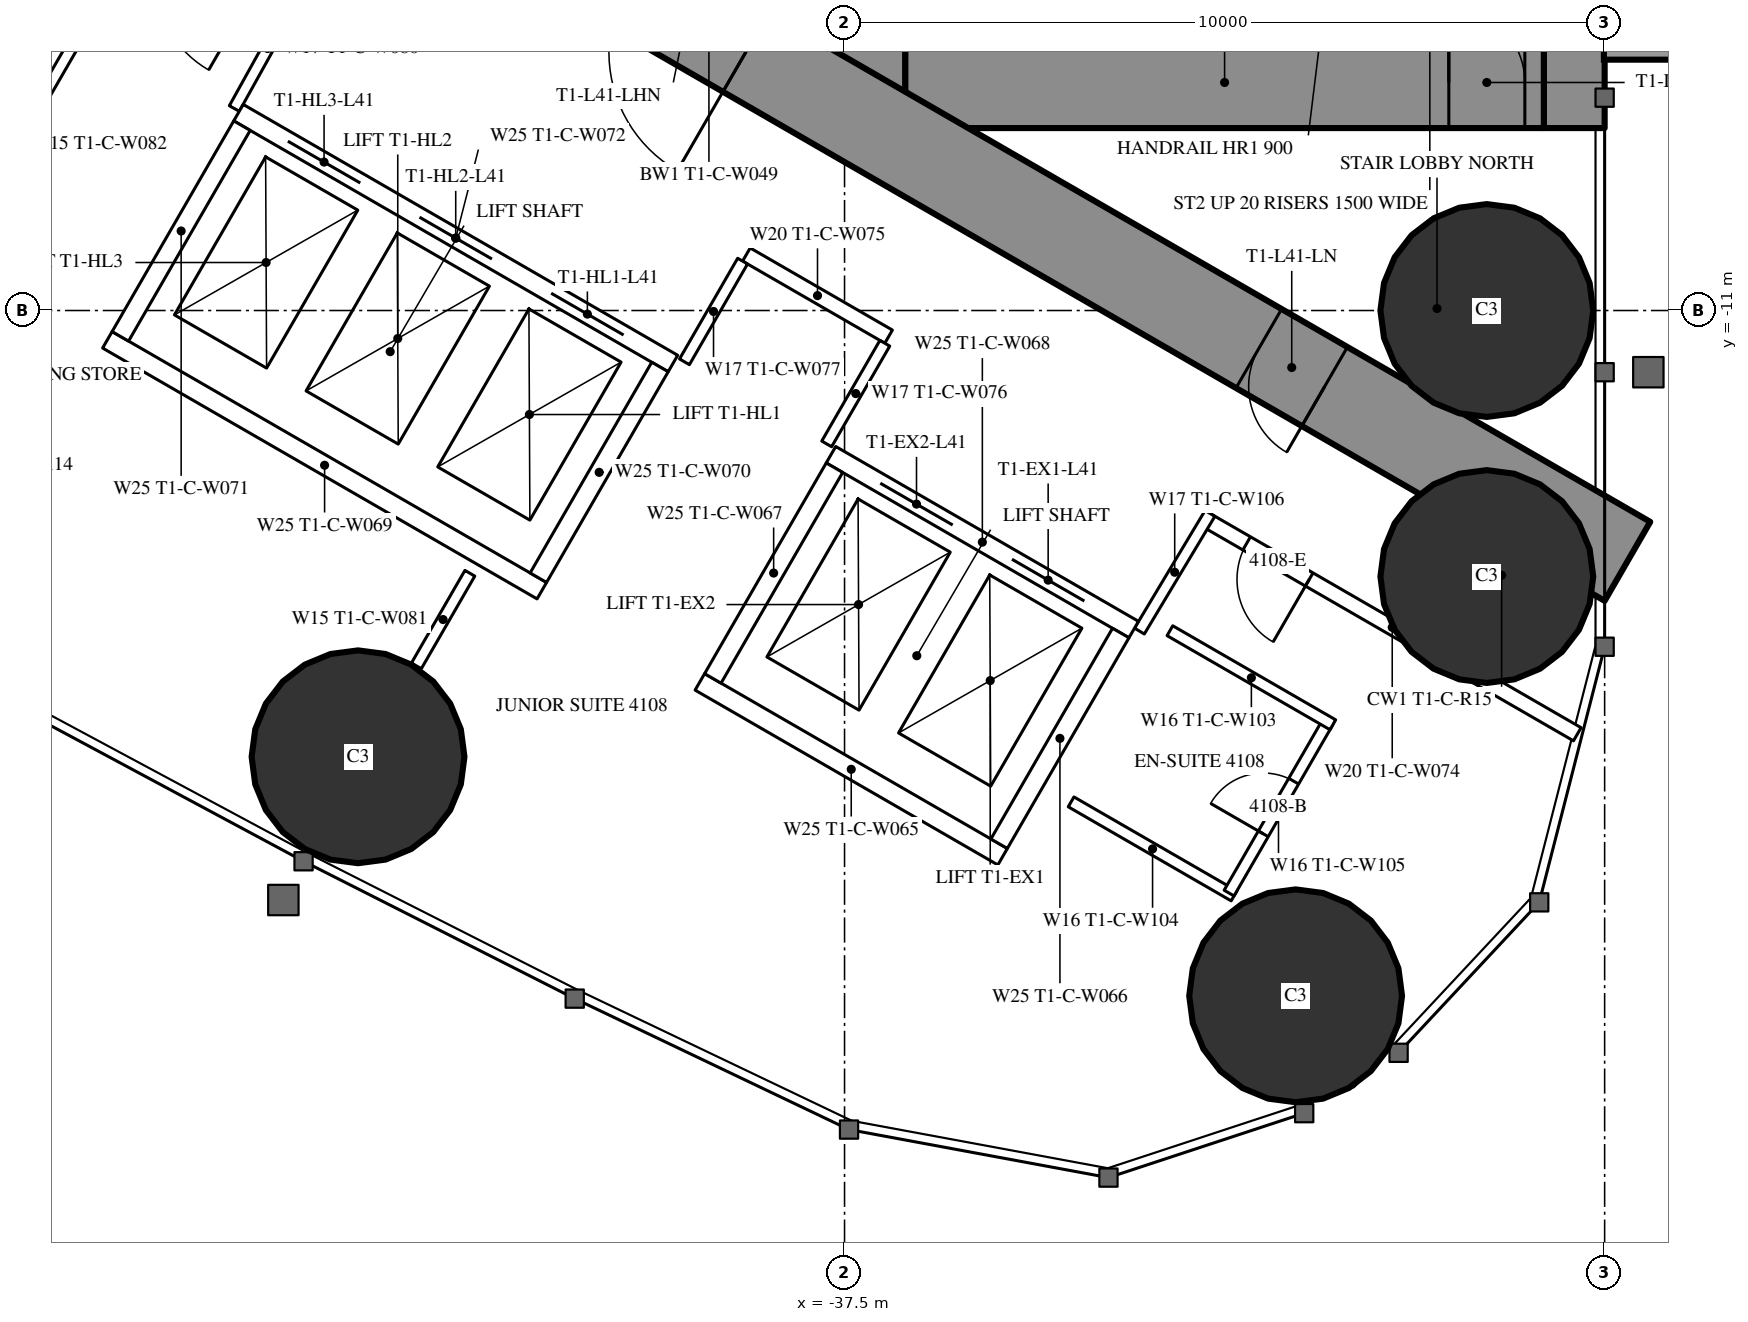
"""IFC4 building model, lengths in metres.
Left out: names, types, materials, properties, quantities, classifications, styles, units other than length and angle.
Written with IfcOpenShell. Run it as: python <this file> out.ifc"""

import sys

from ifc_helpers import new_model, si_unit, direction, frame, frame_2d, origin, origin_2d, place, context, subcontext, project, spatial, rectangle, circle, extrude, element, fill, save


model = new_model("IFC4")
c1 = context("Model", 3, precision=1e-05, world=origin(), true_north=direction((0.0, 1.0)))
c2 = subcontext(c1, "Body", "Model", "MODEL_VIEW")
j1 = project(units=[si_unit("LENGTHUNIT", "METRE"), si_unit("PLANEANGLEUNIT", "RADIAN")], contexts=[c1])
p1 = place(None, origin())
s1 = spatial("IfcSite", under=j1, at=p1, CompositionType="ELEMENT")
p2 = place(p1, origin())
s2 = spatial("IfcBuilding", under=s1, at=p2, CompositionType="ELEMENT")
p3 = place(p2, frame((0.0, 0.0, 156.3)))
s3 = spatial("IfcBuildingStorey", under=s2, at=p3, CompositionType="ELEMENT", Elevation=156.3)
for number, where, z_axis, x_axis in (
    (1, (-31.565, -20.016, 0.0), (0.0, 0.0, 1.0), (1.0, 0.0, 0.0)),
    (2, (-29.05, -11.0, 0.0), (0.0, 0.0, 1.0), (1.0, 0.0, 0.0)),
    (3, (-29.05, -14.5, 0.0), (0.0, 0.0, 1.0), (1.0, 0.0, 0.0)),
    (4, (-43.9, -16.871, 0.0), (0.0, 0.0, 1.0), (1.0, 0.0, 0.0)),
):
    element("IfcColumn", number, at=place(p3, frame(where, z_axis=z_axis, x_axis=x_axis)), inside=s3, PredefinedType="COLUMN", context=c2, shape_type="SweptSolid", body=[
        extrude(circle(Radius=1.4, at=origin_2d()), origin(), (0.0, 0.0, 1.0), 3.5),
    ])
p4 = place(p3, frame((-27.9, 8.6, 0.0), z_axis=(0.0, 0.0, 1.0), x_axis=(0.0, -1.0, 0.0)))
e5 = element("IfcWall", 5, at=p4, inside=s3, PredefinedType="SHEAR", context=c2, shape_type="SweptSolid", body=[
    extrude(rectangle(XDim=17.2, YDim=0.8, at=frame_2d((8.6, 0.0))), origin(), (0.0, 0.0, 1.0), 3.5),
])
p5 = place(p4, frame((2.45, 0.0, 0.6)))
e6 = element("IfcOpeningElement", 6, at=p5, cuts=e5, PredefinedType="OPENING", context=c2, shape_type="SweptSolid", body=[
    extrude(rectangle(XDim=0.6, YDim=2.1, at=frame_2d((0.3, 1.05))), frame((0.0, 0.41, 0.0), z_axis=(0.0, -1.0, 0.0), x_axis=(1.0, 0.0, 0.0)), (0.0, 0.0, 1.0), 0.82),
])
p6 = place(p4, frame((14.15, 0.0, 0.6)))
e7 = element("IfcOpeningElement", 7, at=p6, cuts=e5, PredefinedType="OPENING", context=c2, shape_type="SweptSolid", body=[
    extrude(rectangle(XDim=0.6, YDim=2.1, at=frame_2d((0.3, 1.05))), frame((0.0, 0.41, 0.0), z_axis=(0.0, -1.0, 0.0), x_axis=(1.0, 0.0, 0.0)), (0.0, 0.0, 1.0), 0.82),
])
p7 = place(p3, frame((-37.3, 8.6, 0.0), z_axis=(0.0, 0.0, 1.0), x_axis=(0.0, -1.0, 0.0)))
e8 = element("IfcWall", 8, at=p7, inside=s3, PredefinedType="SHEAR", context=c2, shape_type="SweptSolid", body=[
    extrude(rectangle(XDim=17.2, YDim=1.2, at=frame_2d((8.6, 0.0))), origin(), (0.0, 0.0, 1.0), 3.5),
])
p8 = place(p7, frame((7.7, 0.0, 0.0)))
e9 = element("IfcOpeningElement", 9, at=p8, cuts=e8, PredefinedType="OPENING", context=c2, shape_type="SweptSolid", body=[
    extrude(rectangle(XDim=1.8, YDim=2.2, at=frame_2d((0.9, 1.1))), frame((0.0, 0.61, 0.0), z_axis=(0.0, -1.0, 0.0), x_axis=(1.0, 0.0, 0.0)), (0.0, 0.0, 1.0), 1.22),
])
p9 = place(p3, frame((-28.3, -8.0, 0.0), z_axis=(0.0, 0.0, 1.0), x_axis=(-1.0, 0.0, 0.0)))
e10 = element("IfcWall", 10, at=p9, inside=s3, PredefinedType="SHEAR", context=c2, shape_type="SweptSolid", body=[
    extrude(rectangle(XDim=8.4, YDim=1.2, at=frame_2d((4.2, 0.0))), origin(), (0.0, 0.0, 1.0), 3.5),
])
p10 = place(p9, frame((0.25, 0.0, 0.0)))
e11 = element("IfcOpeningElement", 11, at=p10, cuts=e10, PredefinedType="OPENING", context=c2, shape_type="SweptSolid", body=[
    extrude(rectangle(XDim=1.0, YDim=2.2, at=frame_2d((0.5, 1.1))), frame((0.0, 0.61, 0.0), z_axis=(0.0, -1.0, 0.0), x_axis=(1.0, 0.0, 0.0)), (0.0, 0.0, 1.0), 1.22),
])
p11 = place(p3, frame((-27.2, -14.3, 0.0), z_axis=(0.0, 0.0, 1.0), x_axis=(-0.866024021859, 0.500002393557, 0.0)))
e12 = element("IfcWall", 12, at=p11, inside=s3, PredefinedType="SHEAR", context=c2, shape_type="SweptSolid", body=[
    extrude(rectangle(XDim=27.907, YDim=1.2, at=frame_2d((13.954, 0.0))), origin(), (0.0, 0.0, 1.0), 3.5),
])
p12 = place(p11, frame((4.6, 0.0, 0.0)))
e13 = element("IfcOpeningElement", 13, at=p12, cuts=e12, PredefinedType="OPENING", context=c2, shape_type="SweptSolid", body=[
    extrude(rectangle(XDim=1.0, YDim=2.2, at=frame_2d((0.5, 1.1))), frame((0.0, 0.61, 0.0), z_axis=(0.0, -1.0, 0.0), x_axis=(1.0, 0.0, 0.0)), (0.0, 0.0, 1.0), 1.22),
])
p13 = place(p11, frame((13.395, 0.0, 0.0)))
e14 = element("IfcOpeningElement", 14, at=p13, cuts=e12, PredefinedType="OPENING", context=c2, shape_type="SweptSolid", body=[
    extrude(rectangle(XDim=1.8, YDim=2.2, at=frame_2d((0.9, 1.1))), frame((0.0, 0.61, 0.0), z_axis=(0.0, -1.0, 0.0), x_axis=(1.0, 0.0, 0.0)), (0.0, 0.0, 1.0), 1.22),
])
p14 = place(p3, frame((-46.679, -5.825, 0.0), z_axis=(0.0, 0.0, 1.0), x_axis=(-0.500006839597, -0.866021454905, 0.0)))
e15 = element("IfcWall", 15, at=p14, inside=s3, PredefinedType="PARTITIONING", context=c2, shape_type="SweptSolid", body=[
    extrude(rectangle(XDim=6.911, YDim=0.15, at=frame_2d((3.456, 0.0))), origin(), (0.0, 0.0, 1.0), 2.3),
])
p15 = place(p3, frame((-42.429, -14.457, 0.0), z_axis=(0.0, 0.0, 1.0), x_axis=(-0.5000578829, -0.865991982497, 0.0)))
e16 = element("IfcWall", 16, at=p15, inside=s3, PredefinedType="PARTITIONING", context=c2, shape_type="SweptSolid", body=[
    extrude(rectangle(XDim=1.407, YDim=0.15, at=frame_2d((0.704, 0.0))), origin(), (0.0, 0.0, 1.0), 3.25),
])
p16 = place(p3, frame((-27.86, -16.575, 0.0), z_axis=(0.0, 0.0, 1.0), x_axis=(-0.866019269751, 0.500010624307, 0.0)))
e17 = element("IfcWall", 17, at=p16, inside=s3, PredefinedType="PARTITIONING", context=c2, shape_type="SweptSolid", body=[
    extrude(rectangle(XDim=5.623, YDim=0.2, at=frame_2d((2.811, 0.0))), origin(), (0.0, 0.0, 1.0), 3.25),
])
p17 = place(p16, frame((4.073, 0.0, 0.0)))
e18 = element("IfcOpeningElement", 18, at=p17, cuts=e17, PredefinedType="OPENING", context=c2, shape_type="SweptSolid", body=[
    extrude(rectangle(XDim=0.95, YDim=2.2, at=frame_2d((0.475, 1.1))), frame((0.0, 0.11, 0.0), z_axis=(0.0, -1.0, 0.0), x_axis=(1.0, 0.0, 0.0)), (0.0, 0.0, 1.0), 0.22),
])
p18 = place(p3, frame((-36.92, -11.344, 0.0), z_axis=(0.0, 0.0, 1.0), x_axis=(-0.866065156741, 0.499931139538, 0.0)))
e19 = element("IfcWall", 19, at=p18, inside=s3, PredefinedType="PARTITIONING", context=c2, shape_type="SweptSolid", body=[
    extrude(rectangle(XDim=2.16, YDim=0.2, at=frame_2d((1.08, 0.0))), origin(), (0.0, 0.0, 1.0), 3.25),
])
for number, where, z_axis, x_axis in (
    (20, (-33.621, -15.218, 0.0), (0.0, 0.0, 1.0), (0.514, 0.858, 0.0)),
    (21, (-44.652, -6.764, 0.0), (0.0, 0.0, 1.0), (-0.485, -0.874, 0.0)),
):
    element("IfcWall", number, at=place(p3, frame(where, z_axis=z_axis, x_axis=x_axis)), inside=s3, PredefinedType="PARTITIONING", context=c2, shape_type="SweptSolid", body=[
        extrude(rectangle(XDim=1.805, YDim=0.15, at=frame_2d((0.903, 0.0))), origin(), (0.0, 0.0, 1.0), 3.25),
    ])
p19 = place(p3, frame((-36.97, -11.43, 0.0), z_axis=(0.0, 0.0, 1.0), x_axis=(-0.499985008713, -0.866034058835, 0.0)))
e22 = element("IfcWall", 22, at=p19, inside=s3, PredefinedType="PARTITIONING", context=c2, shape_type="SweptSolid", body=[
    extrude(rectangle(XDim=1.529, YDim=0.15, at=frame_2d((0.765, 0.0))), origin(), (0.0, 0.0, 1.0), 3.25),
])
p20 = place(p3, frame((-38.841, -10.35, 0.0), z_axis=(0.0, 0.0, 1.0), x_axis=(-0.499966498333, -0.866044745117, 0.0)))
e23 = element("IfcWall", 23, at=p20, inside=s3, PredefinedType="PARTITIONING", context=c2, shape_type="SweptSolid", body=[
    extrude(rectangle(XDim=1.53, YDim=0.15, at=frame_2d((0.765, 0.0))), origin(), (0.0, 0.0, 1.0), 3.25),
])
p21 = place(p3, frame((-32.376, -18.702, 0.0), z_axis=(0.0, 0.0, 1.0), x_axis=(-0.866006523861, 0.500032699561, 0.0)))
e24 = element("IfcWall", 24, at=p21, inside=s3, PredefinedType="PARTITIONING", context=c2, shape_type="SweptSolid", body=[
    extrude(rectangle(XDim=2.475, YDim=0.15, at=frame_2d((1.237, 0.0))), origin(), (0.0, 0.0, 1.0), 3.25),
])
p22 = place(p3, frame((-31.141, -16.413, 0.0), z_axis=(0.0, 0.0, 1.0), x_axis=(-0.500006934395, -0.866021400173, 0.0)))
e25 = element("IfcWall", 25, at=p22, inside=s3, PredefinedType="PARTITIONING", context=c2, shape_type="SweptSolid", body=[
    extrude(rectangle(XDim=2.6, YDim=0.15, at=frame_2d((1.3, 0.0))), origin(), (0.0, 0.0, 1.0), 3.25),
])
p23 = place(p22, frame((0.9, 0.0, 0.0)))
e26 = element("IfcOpeningElement", 26, at=p23, cuts=e25, PredefinedType="OPENING", context=c2, shape_type="SweptSolid", body=[
    extrude(rectangle(XDim=0.8, YDim=2.2, at=frame_2d((0.4, 1.1))), frame((0.0, 0.085, 0.0), z_axis=(0.0, -1.0, 0.0), x_axis=(1.0, 0.0, 0.0)), (0.0, 0.0, 1.0), 0.17),
])
p24 = place(p3, frame((-31.076, -16.45, 0.0), z_axis=(0.0, 0.0, 1.0), x_axis=(-0.866073894602, 0.499916002032, 0.0)))
e27 = element("IfcWall", 27, at=p24, inside=s3, PredefinedType="PARTITIONING", context=c2, shape_type="SweptSolid", body=[
    extrude(rectangle(XDim=2.475, YDim=0.15, at=frame_2d((1.238, 0.0))), origin(), (0.0, 0.0, 1.0), 2.45),
])
p25 = place(p3, frame((-33.696, -15.197, 0.0), z_axis=(0.0, 0.0, 1.0), x_axis=(-0.865976953817, 0.500083908417, 0.0)))
e28 = element("IfcWall", 28, at=p25, inside=s3, PredefinedType="PARTITIONING", context=c2, shape_type="SweptSolid", body=[
    extrude(rectangle(XDim=4.599, YDim=0.25, at=frame_2d((2.3, 0.0))), origin(), (0.0, 0.0, 1.0), 3.25),
])
p26 = place(p25, frame((0.75, 0.0, 0.0)))
e29 = element("IfcOpeningElement", 29, at=p26, cuts=e28, PredefinedType="OPENING", context=c2, shape_type="SweptSolid", body=[
    extrude(rectangle(XDim=1.1, YDim=2.2, at=frame_2d((0.55, 1.1))), frame((0.0, 0.135, 0.0), z_axis=(0.0, -1.0, 0.0), x_axis=(1.0, 0.0, 0.0)), (0.0, 0.0, 1.0), 0.27),
])
p27 = place(p25, frame((2.75, 0.0, 0.0)))
e30 = element("IfcOpeningElement", 30, at=p27, cuts=e28, PredefinedType="OPENING", context=c2, shape_type="SweptSolid", body=[
    extrude(rectangle(XDim=1.1, YDim=2.2, at=frame_2d((0.55, 1.1))), frame((0.0, 0.135, 0.0), z_axis=(0.0, -1.0, 0.0), x_axis=(1.0, 0.0, 0.0)), (0.0, 0.0, 1.0), 0.27),
])
p28 = place(p3, frame((-35.42, -18.186, 0.0), z_axis=(0.0, 0.0, 1.0), x_axis=(-0.865990227814, 0.50006092162, 0.0)))
e31 = element("IfcWall", 31, at=p28, inside=s3, PredefinedType="PARTITIONING", context=c2, shape_type="SweptSolid", body=[
    extrude(rectangle(XDim=4.6, YDim=0.25, at=frame_2d((2.3, 0.0))), origin(), (0.0, 0.0, 1.0), 3.25),
])
p29 = place(p3, frame((-33.866, -15.243, 0.0), z_axis=(0.0, 0.0, 1.0), x_axis=(-0.499929347863, -0.866066190972, 0.0)))
e32 = element("IfcWall", 32, at=p29, inside=s3, PredefinedType="PARTITIONING", context=c2, shape_type="SweptSolid", body=[
    extrude(rectangle(XDim=3.201, YDim=0.25, at=frame_2d((1.6, 0.0))), origin(), (0.0, 0.0, 1.0), 3.25),
])
p30 = place(p3, frame((-37.633, -13.068, 0.0), z_axis=(0.0, 0.0, 1.0), x_axis=(-0.499872130319, -0.866099216793, 0.0)))
e33 = element("IfcWall", 33, at=p30, inside=s3, PredefinedType="PARTITIONING", context=c2, shape_type="SweptSolid", body=[
    extrude(rectangle(XDim=3.2, YDim=0.25, at=frame_2d((1.6, 0.0))), origin(), (0.0, 0.0, 1.0), 3.25),
])
p31 = place(p3, frame((-39.758, -11.697, 0.0), z_axis=(0.0, 0.0, 1.0), x_axis=(-0.866024194504, 0.500002094529, 0.0)))
e34 = element("IfcWall", 34, at=p31, inside=s3, PredefinedType="PARTITIONING", context=c2, shape_type="SweptSolid", body=[
    extrude(rectangle(XDim=6.6, YDim=0.25, at=frame_2d((3.3, 0.0))), origin(), (0.0, 0.0, 1.0), 3.25),
])
p32 = place(p31, frame((0.75, 0.0, 0.0)))
e35 = element("IfcOpeningElement", 35, at=p32, cuts=e34, PredefinedType="OPENING", context=c2, shape_type="SweptSolid", body=[
    extrude(rectangle(XDim=1.1, YDim=2.2, at=frame_2d((0.55, 1.1))), frame((0.0, 0.135, 0.0), z_axis=(0.0, -1.0, 0.0), x_axis=(1.0, 0.0, 0.0)), (0.0, 0.0, 1.0), 0.27),
])
p33 = place(p31, frame((2.75, 0.0, 0.0)))
e36 = element("IfcOpeningElement", 36, at=p33, cuts=e34, PredefinedType="OPENING", context=c2, shape_type="SweptSolid", body=[
    extrude(rectangle(XDim=1.1, YDim=2.2, at=frame_2d((0.55, 1.1))), frame((0.0, 0.135, 0.0), z_axis=(0.0, -1.0, 0.0), x_axis=(1.0, 0.0, 0.0)), (0.0, 0.0, 1.0), 0.27),
])
p34 = place(p31, frame((4.75, 0.0, 0.0)))
e37 = element("IfcOpeningElement", 37, at=p34, cuts=e34, PredefinedType="OPENING", context=c2, shape_type="SweptSolid", body=[
    extrude(rectangle(XDim=1.1, YDim=2.2, at=frame_2d((0.55, 1.1))), frame((0.0, 0.135, 0.0), z_axis=(0.0, -1.0, 0.0), x_axis=(1.0, 0.0, 0.0)), (0.0, 0.0, 1.0), 0.27),
])
p35 = place(p3, frame((-41.482, -14.686, 0.0), z_axis=(0.0, 0.0, 1.0), x_axis=(-0.86603344179, 0.499986077507, 0.0)))
e38 = element("IfcWall", 38, at=p35, inside=s3, PredefinedType="PARTITIONING", context=c2, shape_type="SweptSolid", body=[
    extrude(rectangle(XDim=6.6, YDim=0.25, at=frame_2d((3.3, 0.0))), origin(), (0.0, 0.0, 1.0), 3.25),
])
for number, where, z_axis, x_axis in (
    (39, (-39.928, -11.743, 0.0), (0.0, 0.0, 1.0), (-0.5, -0.866, 0.0)),
    (40, (-45.428, -8.568, 0.0), (0.0, 0.0, 1.0), (-0.5, -0.866, 0.0)),
):
    element("IfcWall", number, at=place(p3, frame(where, z_axis=z_axis, x_axis=x_axis)), inside=s3, PredefinedType="PARTITIONING", context=c2, shape_type="SweptSolid", body=[
        extrude(rectangle(XDim=3.201, YDim=0.25, at=frame_2d((1.6, 0.0))), origin(), (0.0, 0.0, 1.0), 3.25),
    ])
p36 = place(p23, origin())
e41 = element("IfcDoor", 41, at=p36, inside=s3, OperationType="SINGLE_SWING_RIGHT", PredefinedType="DOOR", context=c2, shape_type="SweptSolid", body=[
    extrude(rectangle(XDim=0.8, YDim=2.2, at=frame_2d((0.4, 1.1))), frame((0.0, 0.025, 0.0), z_axis=(0.0, -1.0, 0.0), x_axis=(1.0, 0.0, 0.0)), (0.0, 0.0, 1.0), 0.05),
])
fill(e26, e41)
p37 = place(p17, origin())
e42 = element("IfcDoor", 42, at=p37, inside=s3, OperationType="SINGLE_SWING_LEFT", PredefinedType="DOOR", context=c2, shape_type="SweptSolid", body=[
    extrude(rectangle(XDim=0.95, YDim=2.2, at=frame_2d((0.475, 1.1))), frame((0.0, 0.025, 0.0), z_axis=(0.0, -1.0, 0.0), x_axis=(1.0, 0.0, 0.0)), (0.0, 0.0, 1.0), 0.05),
])
fill(e18, e42)
p38 = place(p12, origin())
e43 = element("IfcDoor", 43, at=p38, inside=s3, OperationType="SINGLE_SWING_LEFT", PredefinedType="DOOR", context=c2, shape_type="SweptSolid", body=[
    extrude(rectangle(XDim=1.0, YDim=2.2, at=frame_2d((0.5, 1.1))), frame((0.0, 0.025, 0.0), z_axis=(0.0, -1.0, 0.0), x_axis=(1.0, 0.0, 0.0)), (0.0, 0.0, 1.0), 0.05),
])
fill(e13, e43)
p39 = place(p13, origin())
e44 = element("IfcDoor", 44, at=p39, inside=s3, OperationType="DOUBLE_DOOR_SINGLE_SWING", PredefinedType="DOOR", context=c2, shape_type="SweptSolid", body=[
    extrude(rectangle(XDim=1.8, YDim=2.2, at=frame_2d((0.9, 1.1))), frame((0.0, 0.025, 0.0), z_axis=(0.0, -1.0, 0.0), x_axis=(1.0, 0.0, 0.0)), (0.0, 0.0, 1.0), 0.05),
])
fill(e14, e44)
p40 = place(p10, origin())
e45 = element("IfcDoor", 45, at=p40, inside=s3, OperationType="SINGLE_SWING_RIGHT", PredefinedType="DOOR", context=c2, shape_type="SweptSolid", body=[
    extrude(rectangle(XDim=1.0, YDim=2.2, at=frame_2d((0.5, 1.1))), frame((0.0, 0.025, 0.0), z_axis=(0.0, -1.0, 0.0), x_axis=(1.0, 0.0, 0.0)), (0.0, 0.0, 1.0), 0.05),
])
fill(e11, e45)
p41 = place(p26, origin())
e46 = element("IfcDoor", 46, at=p41, inside=s3, OperationType="DOUBLE_DOOR_SLIDING", PredefinedType="USERDEFINED", context=c2, shape_type="SweptSolid", body=[
    extrude(rectangle(XDim=1.1, YDim=2.2, at=frame_2d((0.55, 1.1))), frame((0.0, 0.025, 0.0), z_axis=(0.0, -1.0, 0.0), x_axis=(1.0, 0.0, 0.0)), (0.0, 0.0, 1.0), 0.05),
])
fill(e29, e46)
p42 = place(p27, origin())
e47 = element("IfcDoor", 47, at=p42, inside=s3, OperationType="DOUBLE_DOOR_SLIDING", PredefinedType="USERDEFINED", context=c2, shape_type="SweptSolid", body=[
    extrude(rectangle(XDim=1.1, YDim=2.2, at=frame_2d((0.55, 1.1))), frame((0.0, 0.025, 0.0), z_axis=(0.0, -1.0, 0.0), x_axis=(1.0, 0.0, 0.0)), (0.0, 0.0, 1.0), 0.05),
])
fill(e30, e47)
p43 = place(p32, origin())
e48 = element("IfcDoor", 48, at=p43, inside=s3, OperationType="DOUBLE_DOOR_SLIDING", PredefinedType="USERDEFINED", context=c2, shape_type="SweptSolid", body=[
    extrude(rectangle(XDim=1.1, YDim=2.2, at=frame_2d((0.55, 1.1))), frame((0.0, 0.025, 0.0), z_axis=(0.0, -1.0, 0.0), x_axis=(1.0, 0.0, 0.0)), (0.0, 0.0, 1.0), 0.05),
])
fill(e35, e48)
p44 = place(p33, origin())
e49 = element("IfcDoor", 49, at=p44, inside=s3, OperationType="DOUBLE_DOOR_SLIDING", PredefinedType="USERDEFINED", context=c2, shape_type="SweptSolid", body=[
    extrude(rectangle(XDim=1.1, YDim=2.2, at=frame_2d((0.55, 1.1))), frame((0.0, 0.025, 0.0), z_axis=(0.0, -1.0, 0.0), x_axis=(1.0, 0.0, 0.0)), (0.0, 0.0, 1.0), 0.05),
])
fill(e36, e49)
p45 = place(p34, origin())
e50 = element("IfcDoor", 50, at=p45, inside=s3, OperationType="DOUBLE_DOOR_SLIDING", PredefinedType="USERDEFINED", context=c2, shape_type="SweptSolid", body=[
    extrude(rectangle(XDim=1.1, YDim=2.2, at=frame_2d((0.55, 1.1))), frame((0.0, 0.025, 0.0), z_axis=(0.0, -1.0, 0.0), x_axis=(1.0, 0.0, 0.0)), (0.0, 0.0, 1.0), 0.05),
])
fill(e37, e50)
save(model, sys.argv[1])
